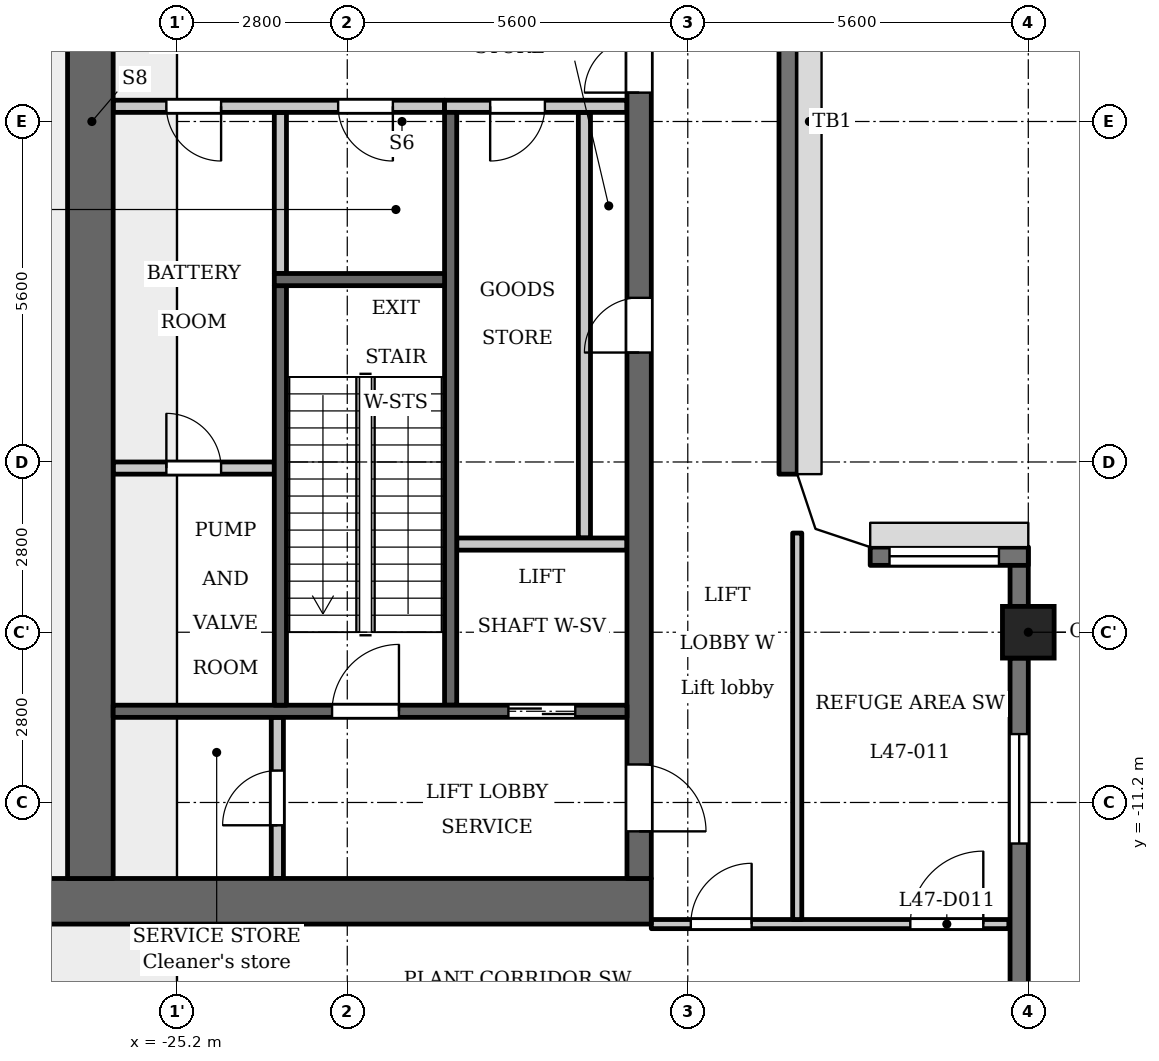
"""IFC4 building model, lengths in metres.
Left out: names, types, materials, properties, quantities, classifications, styles, units other than length and angle.
Written with IfcOpenShell. Run it as: python <this file> out.ifc"""

import sys

from ifc_helpers import new_model, si_unit, direction, frame, frame_2d, origin, origin_2d, place, context, subcontext, project, spatial, polyline, rectangle, outline, extrude, element, fill, save


model = new_model("IFC4")
c1 = context("Model", 3, precision=1e-05, world=origin(), true_north=direction((0.0, 1.0)))
c2 = subcontext(c1, "Body", "Model", "MODEL_VIEW")
j1 = project(units=[si_unit("LENGTHUNIT", "METRE"), si_unit("PLANEANGLEUNIT", "RADIAN")], contexts=[c1])
p1 = place(None, origin())
s1 = spatial("IfcSite", under=j1, at=p1, CompositionType="ELEMENT")
p2 = place(p1, origin())
s2 = spatial("IfcBuilding", under=s1, at=p2, CompositionType="ELEMENT")
p3 = place(p2, frame((0.0, 0.0, 183.5)))
s3 = spatial("IfcBuildingStorey", under=s2, at=p3, CompositionType="ELEMENT", Elevation=183.5)
p4 = place(p3, frame((-11.2, -8.4, 0.0), z_axis=(0.0, 0.0, 1.0), x_axis=(1.0, 0.0, 0.0)))
e1 = element("IfcColumn", 1, at=p4, inside=s3, PredefinedType="COLUMN", context=c2, shape_type="SweptSolid", body=[
    extrude(rectangle(XDim=0.85, YDim=0.85, at=origin_2d()), origin(), (0.0, 0.0, 1.0), 5.4),
])
p5 = place(p3, frame((-11.35, -15.025, 0.0), z_axis=(0.0, 0.0, 1.0), x_axis=(0.0, 1.0, 0.0)))
e2 = element("IfcWall", 2, at=p5, inside=s3, PredefinedType="SOLIDWALL", context=c2, shape_type="SweptSolid", body=[
    extrude(rectangle(XDim=6.2, YDim=0.3, at=frame_2d((3.1, 0.0))), origin(), (0.0, 0.0, 1.0), 4.6),
])
p6 = place(p5, frame((3.15, 0.0, 0.9)))
e3 = element("IfcOpeningElement", 3, at=p6, cuts=e2, PredefinedType="OPENING", context=c2, shape_type="SweptSolid", body=[
    extrude(rectangle(XDim=1.8, YDim=1.5, at=frame_2d((0.9, 0.75))), frame((0.0, 0.16, 0.0), z_axis=(0.0, -1.0, 0.0), x_axis=(1.0, 0.0, 0.0)), (0.0, 0.0, 1.0), 0.32),
])
p7 = place(p3, frame((-11.35, -7.975, 0.0), z_axis=(0.0, 0.0, 1.0), x_axis=(0.0, 1.0, 0.0)))
e4 = element("IfcWall", 4, at=p7, inside=s3, PredefinedType="SOLIDWALL", context=c2, shape_type="SweptSolid", body=[
    extrude(rectangle(XDim=0.975, YDim=0.3, at=frame_2d((0.488, 0.0))), origin(), (0.0, 0.0, 1.0), 4.6),
])
p8 = place(p3, frame((-11.2, -7.15, 0.0), z_axis=(0.0, 0.0, 1.0), x_axis=(-1.0, 0.0, 0.0)))
e5 = element("IfcWall", 5, at=p8, inside=s3, PredefinedType="SOLIDWALL", context=c2, shape_type="SweptSolid", body=[
    extrude(rectangle(XDim=2.6, YDim=0.3, at=frame_2d((1.3, 0.0))), origin(), (0.0, 0.0, 1.0), 4.6),
])
p9 = place(p8, frame((0.482, 0.0, 0.9)))
e6 = element("IfcOpeningElement", 6, at=p9, cuts=e5, PredefinedType="OPENING", context=c2, shape_type="SweptSolid", body=[
    extrude(rectangle(XDim=1.8, YDim=1.5, at=frame_2d((0.9, 0.75))), frame((0.0, 0.16, 0.0), z_axis=(0.0, -1.0, 0.0), x_axis=(1.0, 0.0, 0.0)), (0.0, 0.0, 1.0), 0.32),
])
p10 = place(p3, frame((-15.15, -5.8, 0.0), z_axis=(0.0, 0.0, 1.0), x_axis=(0.0, 1.0, 0.0)))
e7 = element("IfcWall", 7, at=p10, inside=s3, PredefinedType="SOLIDWALL", context=c2, shape_type="SweptSolid", body=[
    extrude(rectangle(XDim=11.6, YDim=0.3, at=frame_2d((5.8, 0.0))), origin(), (0.0, 0.0, 1.0), 4.6),
])
p11 = place(p3, frame((-23.5, -2.5, 0.0), z_axis=(0.0, 0.0, 1.0), x_axis=(0.0, 1.0, 0.0)))
e8 = element("IfcWall", 8, at=p11, inside=s3, PredefinedType="PARTITIONING", context=c2, shape_type="SweptSolid", body=[
    extrude(rectangle(XDim=2.65, YDim=0.2, at=frame_2d((1.325, 0.0))), origin(), (0.0, 0.0, 1.0), 4.6),
])
p12 = place(p3, frame((-20.7, -9.6, 0.0), z_axis=(0.0, 0.0, 1.0), x_axis=(0.0, 1.0, 0.0)))
e9 = element("IfcWall", 9, at=p12, inside=s3, PredefinedType="SHEAR", context=c2, shape_type="SweptSolid", body=[
    extrude(rectangle(XDim=9.75, YDim=0.2, at=frame_2d((4.875, 0.0))), origin(), (0.0, 0.0, 1.0), 4.6),
])
p13 = place(p3, frame((-20.8, 0.25, 0.0), z_axis=(0.0, 0.0, 1.0), x_axis=(-1.0, 0.0, 0.0)))
e10 = element("IfcWall", 10, at=p13, inside=s3, PredefinedType="PARTITIONING", context=c2, shape_type="SweptSolid", body=[
    extrude(rectangle(XDim=5.45, YDim=0.2, at=frame_2d((2.725, 0.0))), origin(), (0.0, 0.0, 1.0), 4.6),
])
p14 = place(p13, frame((0.85, 0.0, 0.0)))
e11 = element("IfcOpeningElement", 11, at=p14, cuts=e10, PredefinedType="OPENING", context=c2, shape_type="SweptSolid", body=[
    extrude(rectangle(XDim=0.9, YDim=2.1, at=frame_2d((0.45, 1.05))), frame((0.0, 0.11, 0.0), z_axis=(0.0, -1.0, 0.0), x_axis=(1.0, 0.0, 0.0)), (0.0, 0.0, 1.0), 0.22),
])
p15 = place(p13, frame((3.675, 0.0, 0.0)))
e12 = element("IfcOpeningElement", 12, at=p15, cuts=e10, PredefinedType="OPENING", context=c2, shape_type="SweptSolid", body=[
    extrude(rectangle(XDim=0.9, YDim=2.1, at=frame_2d((0.45, 1.05))), frame((0.0, 0.11, 0.0), z_axis=(0.0, -1.0, 0.0), x_axis=(1.0, 0.0, 0.0)), (0.0, 0.0, 1.0), 0.22),
])
p16 = place(p3, frame((-17.4, -12.825, 0.0), z_axis=(0.0, 0.0, 1.0), x_axis=(-1.0, 0.0, 0.0)))
e13 = element("IfcWall", 13, at=p16, inside=s3, PredefinedType="SHEAR", context=c2, shape_type="SweptSolid", body=[
    extrude(rectangle(XDim=10.4, YDim=0.75, at=frame_2d((5.2, 0.0))), origin(), (0.0, 0.0, 1.0), 4.6),
])
p17 = place(p3, frame((-18.5, -6.85, 0.0), z_axis=(0.0, 0.0, 1.0), x_axis=(0.0, 1.0, 0.0)))
e14 = element("IfcWall", 14, at=p17, inside=s3, PredefinedType="PARTITIONING", context=c2, shape_type="SweptSolid", body=[
    extrude(rectangle(XDim=7.0, YDim=0.2, at=frame_2d((3.5, 0.0))), origin(), (0.0, 0.0, 1.0), 4.6),
])
p18 = place(p3, frame((-17.6, -12.45, 0.0), z_axis=(0.0, 0.0, 1.0), x_axis=(0.0, 1.0, 0.0)))
e15 = element("IfcWall", 15, at=p18, inside=s3, PredefinedType="SHEAR", context=c2, shape_type="SweptSolid", body=[
    extrude(rectangle(XDim=24.9, YDim=0.4, at=frame_2d((12.45, 0.0))), origin(), (0.0, 0.0, 1.0), 4.6),
])
p19 = place(p18, frame((8.65, 0.0, 0.0)))
e16 = element("IfcOpeningElement", 16, at=p19, cuts=e15, PredefinedType="OPENING", context=c2, shape_type="SweptSolid", body=[
    extrude(rectangle(XDim=0.9, YDim=2.1, at=frame_2d((0.45, 1.05))), frame((0.0, 0.21, 0.0), z_axis=(0.0, -1.0, 0.0), x_axis=(1.0, 0.0, 0.0)), (0.0, 0.0, 1.0), 0.42),
])
p20 = place(p18, frame((15.6, 0.0, 0.0)))
e17 = element("IfcOpeningElement", 17, at=p20, cuts=e15, PredefinedType="OPENING", context=c2, shape_type="SweptSolid", body=[
    extrude(rectangle(XDim=1.1, YDim=2.1, at=frame_2d((0.55, 1.05))), frame((0.0, 0.21, 0.0), z_axis=(0.0, -1.0, 0.0), x_axis=(1.0, 0.0, 0.0)), (0.0, 0.0, 1.0), 0.42),
])
p21 = place(p18, frame((18.0, 0.0, 0.0)))
e18 = element("IfcOpeningElement", 18, at=p21, cuts=e15, PredefinedType="OPENING", context=c2, shape_type="SweptSolid", body=[
    extrude(rectangle(XDim=1.1, YDim=2.1, at=frame_2d((0.55, 1.05))), frame((0.0, 0.21, 0.0), z_axis=(0.0, -1.0, 0.0), x_axis=(1.0, 0.0, 0.0)), (0.0, 0.0, 1.0), 0.42),
])
p22 = place(p18, frame((23.025, 0.0, 0.0)))
e19 = element("IfcOpeningElement", 19, at=p22, cuts=e15, PredefinedType="OPENING", context=c2, shape_type="SweptSolid", body=[
    extrude(rectangle(XDim=1.1, YDim=2.1, at=frame_2d((0.55, 1.05))), frame((0.0, 0.21, 0.0), z_axis=(0.0, -1.0, 0.0), x_axis=(1.0, 0.0, 0.0)), (0.0, 0.0, 1.0), 0.42),
])
p23 = place(p18, frame((0.775, 0.0, 0.0)))
e20 = element("IfcOpeningElement", 20, at=p23, cuts=e15, PredefinedType="OPENING", context=c2, shape_type="SweptSolid", body=[
    extrude(rectangle(XDim=1.1, YDim=2.1, at=frame_2d((0.55, 1.05))), frame((0.0, 0.21, 0.0), z_axis=(0.0, -1.0, 0.0), x_axis=(1.0, 0.0, 0.0)), (0.0, 0.0, 1.0), 0.42),
])
p24 = place(p18, frame((12.925, 0.0, 0.0)))
e21 = element("IfcOpeningElement", 21, at=p24, cuts=e15, PredefinedType="OPENING", context=c2, shape_type="SweptSolid", body=[
    extrude(rectangle(XDim=1.8, YDim=2.1, at=frame_2d((0.9, 1.05))), frame((0.0, 0.21, 0.0), z_axis=(0.0, -1.0, 0.0), x_axis=(1.0, 0.0, 0.0)), (0.0, 0.0, 1.0), 0.42),
])
p25 = place(p3, frame((-26.625, -12.45, 0.0), z_axis=(0.0, 0.0, 1.0), x_axis=(0.0, 1.0, 0.0)))
e22 = element("IfcWall", 22, at=p25, inside=s3, PredefinedType="SHEAR", context=c2, shape_type="SweptSolid", body=[
    extrude(rectangle(XDim=24.9, YDim=0.75, at=frame_2d((12.45, 0.0))), origin(), (0.0, 0.0, 1.0), 4.6),
])
p26 = place(p3, frame((-23.55, -12.45, 0.0), z_axis=(0.0, 0.0, 1.0), x_axis=(0.0, 1.0, 0.0)))
e23 = element("IfcWall", 23, at=p26, inside=s3, PredefinedType="PARTITIONING", context=c2, shape_type="SweptSolid", body=[
    extrude(rectangle(XDim=2.65, YDim=0.2, at=frame_2d((1.325, 0.0))), origin(), (0.0, 0.0, 1.0), 4.6),
])
p27 = place(p26, frame((0.875, 0.0, 0.0)))
e24 = element("IfcOpeningElement", 24, at=p27, cuts=e23, PredefinedType="OPENING", context=c2, shape_type="SweptSolid", body=[
    extrude(rectangle(XDim=0.9, YDim=2.1, at=frame_2d((0.45, 1.05))), frame((0.0, 0.11, 0.0), z_axis=(0.0, -1.0, 0.0), x_axis=(1.0, 0.0, 0.0)), (0.0, 0.0, 1.0), 0.22),
])
p28 = place(p3, frame((-23.6, -5.7, 0.0), z_axis=(0.0, 0.0, 1.0), x_axis=(-1.0, 0.0, 0.0)))
e25 = element("IfcWall", 25, at=p28, inside=s3, PredefinedType="PARTITIONING", context=c2, shape_type="SweptSolid", body=[
    extrude(rectangle(XDim=2.65, YDim=0.2, at=frame_2d((1.325, 0.0))), origin(), (0.0, 0.0, 1.0), 4.6),
])
p29 = place(p28, frame((0.875, 0.0, 0.0)))
e26 = element("IfcOpeningElement", 26, at=p29, cuts=e25, PredefinedType="OPENING", context=c2, shape_type="SweptSolid", body=[
    extrude(rectangle(XDim=0.9, YDim=2.1, at=frame_2d((0.45, 1.05))), frame((0.0, 0.11, 0.0), z_axis=(0.0, -1.0, 0.0), x_axis=(1.0, 0.0, 0.0)), (0.0, 0.0, 1.0), 0.22),
])
p30 = place(p3, frame((-17.8, -9.7, 0.0), z_axis=(0.0, 0.0, 1.0), x_axis=(-1.0, 0.0, 0.0)))
e27 = element("IfcWall", 27, at=p30, inside=s3, PredefinedType="SHEAR", context=c2, shape_type="SweptSolid", body=[
    extrude(rectangle(XDim=8.45, YDim=0.2, at=frame_2d((4.225, 0.0))), origin(), (0.0, 0.0, 1.0), 4.6),
])
p31 = place(p30, frame((0.85, 0.0, 0.0)))
e28 = element("IfcOpeningElement", 28, at=p31, cuts=e27, PredefinedType="OPENING", context=c2, shape_type="SweptSolid", body=[
    extrude(rectangle(XDim=1.1, YDim=2.1, at=frame_2d((0.55, 1.05))), frame((0.0, 0.11, 0.0), z_axis=(0.0, -1.0, 0.0), x_axis=(1.0, 0.0, 0.0)), (0.0, 0.0, 1.0), 0.22),
])
p32 = place(p30, frame((3.75, 0.0, 0.0)))
e29 = element("IfcOpeningElement", 29, at=p32, cuts=e27, PredefinedType="OPENING", context=c2, shape_type="SweptSolid", body=[
    extrude(rectangle(XDim=1.1, YDim=2.1, at=frame_2d((0.55, 1.05))), frame((0.0, 0.11, 0.0), z_axis=(0.0, -1.0, 0.0), x_axis=(1.0, 0.0, 0.0)), (0.0, 0.0, 1.0), 0.22),
])
p33 = place(p3, frame((-17.8, -6.95, 0.0), z_axis=(0.0, 0.0, 1.0), x_axis=(-1.0, 0.0, 0.0)))
e30 = element("IfcWall", 30, at=p33, inside=s3, PredefinedType="PARTITIONING", context=c2, shape_type="SweptSolid", body=[
    extrude(rectangle(XDim=2.8, YDim=0.2, at=frame_2d((1.4, 0.0))), origin(), (0.0, 0.0, 1.0), 4.6),
])
p34 = place(p3, frame((-17.8, 0.25, 0.0), z_axis=(0.0, 0.0, 1.0), x_axis=(-1.0, 0.0, 0.0)))
e31 = element("IfcWall", 31, at=p34, inside=s3, PredefinedType="PARTITIONING", context=c2, shape_type="SweptSolid", body=[
    extrude(rectangle(XDim=3.0, YDim=0.2, at=frame_2d((1.5, 0.0))), origin(), (0.0, 0.0, 1.0), 4.6),
])
p35 = place(p34, frame((1.35, 0.0, 0.0)))
e32 = element("IfcOpeningElement", 32, at=p35, cuts=e31, PredefinedType="OPENING", context=c2, shape_type="SweptSolid", body=[
    extrude(rectangle(XDim=0.9, YDim=2.1, at=frame_2d((0.45, 1.05))), frame((0.0, 0.11, 0.0), z_axis=(0.0, -1.0, 0.0), x_axis=(1.0, 0.0, 0.0)), (0.0, 0.0, 1.0), 0.22),
])
p36 = place(p3, frame((-23.5, -9.6, 0.0), z_axis=(0.0, 0.0, 1.0), x_axis=(0.0, 1.0, 0.0)))
e33 = element("IfcWall", 33, at=p36, inside=s3, PredefinedType="SHEAR", context=c2, shape_type="SweptSolid", body=[
    extrude(rectangle(XDim=6.9, YDim=0.2, at=frame_2d((3.45, 0.0))), origin(), (0.0, 0.0, 1.0), 4.6),
])
p37 = place(p3, frame((-20.8, -2.6, 0.0), z_axis=(0.0, 0.0, 1.0), x_axis=(-1.0, 0.0, 0.0)))
e34 = element("IfcWall", 34, at=p37, inside=s3, PredefinedType="SHEAR", context=c2, shape_type="SweptSolid", body=[
    extrude(rectangle(XDim=2.8, YDim=0.2, at=frame_2d((1.4, 0.0))), origin(), (0.0, 0.0, 1.0), 4.6),
])
p38 = place(p3, frame((-17.4, -13.2, 0.0), z_axis=(0.0, 0.0, 1.0), x_axis=(1.0, 0.0, 0.0)))
e35 = element("IfcWall", 35, at=p38, inside=s3, PredefinedType="PARTITIONING", context=c2, shape_type="SweptSolid", body=[
    extrude(rectangle(XDim=5.88, YDim=0.15, at=frame_2d((2.94, 0.0))), origin(), (0.0, 0.0, 1.0), 4.6),
])
p39 = place(p38, frame((0.65, 0.0, 0.0)))
e36 = element("IfcOpeningElement", 36, at=p39, cuts=e35, PredefinedType="OPENING", context=c2, shape_type="SweptSolid", body=[
    extrude(rectangle(XDim=1.0, YDim=2.1, at=frame_2d((0.5, 1.05))), frame((0.0, 0.085, 0.0), z_axis=(0.0, -1.0, 0.0), x_axis=(1.0, 0.0, 0.0)), (0.0, 0.0, 1.0), 0.17),
])
p40 = place(p38, frame((4.26, 0.0, 0.0)))
e37 = element("IfcOpeningElement", 37, at=p40, cuts=e35, PredefinedType="OPENING", context=c2, shape_type="SweptSolid", body=[
    extrude(rectangle(XDim=1.2, YDim=2.1, at=frame_2d((0.6, 1.05))), frame((0.0, 0.085, 0.0), z_axis=(0.0, -1.0, 0.0), x_axis=(1.0, 0.0, 0.0)), (0.0, 0.0, 1.0), 0.17),
])
p41 = place(p3, frame((-15.0, -13.125, 0.0), z_axis=(0.0, 0.0, 1.0), x_axis=(0.0, 1.0, 0.0)))
e38 = element("IfcWall", 38, at=p41, inside=s3, PredefinedType="PARTITIONING", context=c2, shape_type="SweptSolid", body=[
    extrude(rectangle(XDim=6.356, YDim=0.15, at=frame_2d((3.178, 0.0))), origin(), (0.0, 0.0, 1.0), 4.6),
])
p42 = place(p3, origin())
e39 = element("IfcWall", 39, at=p42, inside=s3, PredefinedType="SOLIDWALL", context=c2, shape_type="SweptSolid", body=[
    extrude(outline(polyline([(-13.8, -7.0), (-14.7, -6.7), (-15.0, -5.8), (-15.3, -5.8), (-15.3, -5.849), (-14.937, -6.937), (-13.849, -7.3), (-13.8, -7.3), (-13.8, -7.0)])), origin(), (0.0, 0.0, 1.0), 4.6),
])
p43 = place(p31, origin())
e40 = element("IfcDoor", 40, at=p43, inside=s3, OperationType="DOUBLE_DOOR_SLIDING", PredefinedType="DOOR", context=c2, shape_type="SweptSolid", body=[
    extrude(rectangle(XDim=1.1, YDim=2.1, at=frame_2d((0.55, 1.05))), frame((0.0, 0.025, 0.0), z_axis=(0.0, -1.0, 0.0), x_axis=(1.0, 0.0, 0.0)), (0.0, 0.0, 1.0), 0.05),
])
fill(e28, e40)
p44 = place(p19, origin())
e41 = element("IfcDoor", 41, at=p44, inside=s3, OperationType="SINGLE_SWING_RIGHT", PredefinedType="DOOR", context=c2, shape_type="SweptSolid", body=[
    extrude(rectangle(XDim=0.9, YDim=2.1, at=frame_2d((0.45, 1.05))), frame((0.0, 0.025, 0.0), z_axis=(0.0, -1.0, 0.0), x_axis=(1.0, 0.0, 0.0)), (0.0, 0.0, 1.0), 0.05),
])
fill(e16, e41)
p45 = place(p35, origin())
e42 = element("IfcDoor", 42, at=p45, inside=s3, OperationType="SINGLE_SWING_LEFT", PredefinedType="DOOR", context=c2, shape_type="SweptSolid", body=[
    extrude(rectangle(XDim=0.9, YDim=2.1, at=frame_2d((0.45, 1.05))), frame((0.0, 0.025, 0.0), z_axis=(0.0, -1.0, 0.0), x_axis=(1.0, 0.0, 0.0)), (0.0, 0.0, 1.0), 0.05),
])
fill(e32, e42)
p46 = place(p23, origin())
e43 = element("IfcDoor", 43, at=p46, inside=s3, OperationType="SINGLE_SWING_LEFT", PredefinedType="DOOR", context=c2, shape_type="SweptSolid", body=[
    extrude(rectangle(XDim=1.1, YDim=2.1, at=frame_2d((0.55, 1.05))), frame((0.0, 0.025, 0.0), z_axis=(0.0, -1.0, 0.0), x_axis=(1.0, 0.0, 0.0)), (0.0, 0.0, 1.0), 0.05),
])
fill(e20, e43)
p47 = place(p27, origin())
e44 = element("IfcDoor", 44, at=p47, inside=s3, OperationType="SINGLE_SWING_RIGHT", PredefinedType="DOOR", context=c2, shape_type="SweptSolid", body=[
    extrude(rectangle(XDim=0.9, YDim=2.1, at=frame_2d((0.45, 1.05))), frame((0.0, 0.025, 0.0), z_axis=(0.0, -1.0, 0.0), x_axis=(1.0, 0.0, 0.0)), (0.0, 0.0, 1.0), 0.05),
])
fill(e24, e44)
p48 = place(p32, origin())
e45 = element("IfcDoor", 45, at=p48, inside=s3, OperationType="SINGLE_SWING_LEFT", PredefinedType="DOOR", context=c2, shape_type="SweptSolid", body=[
    extrude(rectangle(XDim=1.1, YDim=2.1, at=frame_2d((0.55, 1.05))), frame((0.0, 0.025, 0.0), z_axis=(0.0, -1.0, 0.0), x_axis=(1.0, 0.0, 0.0)), (0.0, 0.0, 1.0), 0.05),
])
fill(e29, e45)
p49 = place(p24, origin())
e46 = element("IfcDoor", 46, at=p49, inside=s3, OperationType="DOUBLE_DOOR_SINGLE_SWING", PredefinedType="DOOR", context=c2, shape_type="SweptSolid", body=[
    extrude(rectangle(XDim=1.8, YDim=2.1, at=frame_2d((0.9, 1.05))), frame((0.0, 0.025, 0.0), z_axis=(0.0, -1.0, 0.0), x_axis=(1.0, 0.0, 0.0)), (0.0, 0.0, 1.0), 0.05),
])
fill(e21, e46)
p50 = place(p14, origin())
e47 = element("IfcDoor", 47, at=p50, inside=s3, OperationType="SINGLE_SWING_RIGHT", PredefinedType="DOOR", context=c2, shape_type="SweptSolid", body=[
    extrude(rectangle(XDim=0.9, YDim=2.1, at=frame_2d((0.45, 1.05))), frame((0.0, 0.025, 0.0), z_axis=(0.0, -1.0, 0.0), x_axis=(1.0, 0.0, 0.0)), (0.0, 0.0, 1.0), 0.05),
])
fill(e11, e47)
p51 = place(p29, origin())
e48 = element("IfcDoor", 48, at=p51, inside=s3, OperationType="SINGLE_SWING_RIGHT", PredefinedType="DOOR", context=c2, shape_type="SweptSolid", body=[
    extrude(rectangle(XDim=0.9, YDim=2.1, at=frame_2d((0.45, 1.05))), frame((0.0, 0.025, 0.0), z_axis=(0.0, -1.0, 0.0), x_axis=(1.0, 0.0, 0.0)), (0.0, 0.0, 1.0), 0.05),
])
fill(e26, e48)
p52 = place(p15, origin())
e49 = element("IfcDoor", 49, at=p52, inside=s3, OperationType="SINGLE_SWING_RIGHT", PredefinedType="DOOR", context=c2, shape_type="SweptSolid", body=[
    extrude(rectangle(XDim=0.9, YDim=2.1, at=frame_2d((0.45, 1.05))), frame((0.0, 0.025, 0.0), z_axis=(0.0, -1.0, 0.0), x_axis=(1.0, 0.0, 0.0)), (0.0, 0.0, 1.0), 0.05),
])
fill(e12, e49)
p53 = place(p39, origin())
e50 = element("IfcDoor", 50, at=p53, inside=s3, OperationType="SINGLE_SWING_LEFT", PredefinedType="DOOR", context=c2, shape_type="SweptSolid", body=[
    extrude(rectangle(XDim=1.0, YDim=2.1, at=frame_2d((0.5, 1.05))), frame((0.0, 0.025, 0.0), z_axis=(0.0, -1.0, 0.0), x_axis=(1.0, 0.0, 0.0)), (0.0, 0.0, 1.0), 0.05),
])
fill(e36, e50)
p54 = place(p40, origin())
e51 = element("IfcDoor", 51, at=p54, inside=s3, OperationType="SINGLE_SWING_LEFT", PredefinedType="DOOR", context=c2, shape_type="SweptSolid", body=[
    extrude(rectangle(XDim=1.2, YDim=2.1, at=frame_2d((0.6, 1.05))), frame((0.0, 0.025, 0.0), z_axis=(0.0, -1.0, 0.0), x_axis=(1.0, 0.0, 0.0)), (0.0, 0.0, 1.0), 0.05),
])
fill(e37, e51)
p55 = place(p6, origin())
e52 = element("IfcWindow", 52, at=p55, inside=s3, PartitioningType="SINGLE_PANEL", PredefinedType="WINDOW", context=c2, shape_type="SweptSolid", body=[
    extrude(rectangle(XDim=1.8, YDim=1.5, at=frame_2d((0.9, 0.75))), frame((0.0, 0.03, 0.0), z_axis=(0.0, -1.0, 0.0), x_axis=(1.0, 0.0, 0.0)), (0.0, 0.0, 1.0), 0.06),
])
fill(e3, e52)
p56 = place(p9, origin())
e53 = element("IfcWindow", 53, at=p56, inside=s3, PartitioningType="SINGLE_PANEL", PredefinedType="WINDOW", context=c2, shape_type="SweptSolid", body=[
    extrude(rectangle(XDim=1.8, YDim=1.5, at=frame_2d((0.9, 0.75))), frame((0.0, 0.03, 0.0), z_axis=(0.0, -1.0, 0.0), x_axis=(1.0, 0.0, 0.0)), (0.0, 0.0, 1.0), 0.06),
])
fill(e6, e53)
save(model, sys.argv[1])
